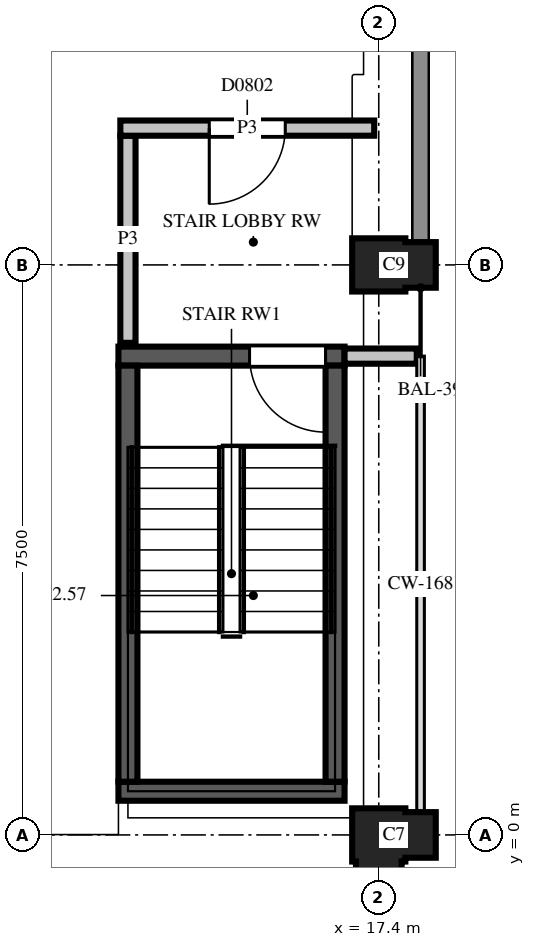
"""IFC4 building model, lengths in metres.
Left out: names, types, materials, properties, quantities, classifications, styles, units other than length and angle.
Written with IfcOpenShell. Run it as: python <this file> out.ifc"""

import sys

from ifc_helpers import new_model, si_unit, direction, frame, frame_2d, origin, place, context, subcontext, project, spatial, polyline, rectangle, outline, extrude, element, fill, save


model = new_model("IFC4")
c1 = context("Model", 3, precision=1e-05, world=origin(), true_north=direction((0.0, 1.0)))
c2 = subcontext(c1, "Body", "Model", "MODEL_VIEW")
j1 = project(units=[si_unit("LENGTHUNIT", "METRE"), si_unit("PLANEANGLEUNIT", "RADIAN")], contexts=[c1])
p1 = place(None, origin())
s1 = spatial("IfcSite", under=j1, at=p1, CompositionType="ELEMENT")
p2 = place(p1, origin())
s2 = spatial("IfcBuilding", under=s1, at=p2, CompositionType="ELEMENT")
p3 = place(p2, frame((0.0, 0.0, 30.4)))
s3 = spatial("IfcBuildingStorey", under=s2, at=p3, CompositionType="ELEMENT", Elevation=30.4)
p4 = place(p3, frame((17.4, 0.0, 0.0), z_axis=(0.0, 0.0, 1.0), x_axis=(0.0, -1.0, 0.0)))
e1 = element("IfcColumn", 1, at=p4, inside=s3, PredefinedType="COLUMN", context=c2, shape_type="SweptSolid", body=[
    extrude(outline(polyline([(-0.35, -0.35), (0.35, -0.35), (0.35, -0.3), (0.75, -0.3), (0.75, 0.3), (0.35, 0.3), (0.35, 0.35), (0.3, 0.35), (0.3, 0.75), (-0.3, 0.75), (-0.3, 0.35), (-0.35, 0.35), (-0.35, -0.35)])), origin(), (0.0, 0.0, 1.0), 3.7),
])
p5 = place(p3, frame((17.4, 7.5, 0.0), z_axis=(0.0, 0.0, 1.0), x_axis=(1.0, 0.0, 0.0)))
e2 = element("IfcColumn", 2, at=p5, inside=s3, PredefinedType="COLUMN", context=c2, shape_type="SweptSolid", body=[
    extrude(outline(polyline([(-0.35, -0.35), (0.35, -0.35), (0.35, -0.3), (0.75, -0.3), (0.75, 0.3), (0.35, 0.3), (0.35, 0.35), (-0.35, 0.35), (-0.35, -0.35)])), origin(), (0.0, 0.0, 1.0), 3.7),
])
p6 = place(p3, frame((13.975, 0.575, 0.0), z_axis=(0.0, 0.0, 1.0), x_axis=(1.0, 0.0, 0.0)))
e3 = element("IfcWall", 3, at=p6, inside=s3, PredefinedType="SHEAR", context=c2, shape_type="SweptSolid", body=[
    extrude(rectangle(XDim=2.975, YDim=0.25, at=frame_2d((1.487, 0.0))), origin(), (0.0, 0.0, 1.0), 3.7),
])
p7 = place(p3, frame((13.975, 6.3, 0.0), z_axis=(0.0, 0.0, 1.0), x_axis=(1.0, 0.0, 0.0)))
e4 = element("IfcWall", 4, at=p7, inside=s3, PredefinedType="SHEAR", context=c2, shape_type="SweptSolid", body=[
    extrude(rectangle(XDim=2.975, YDim=0.25, at=frame_2d((1.487, 0.0))), origin(), (0.0, 0.0, 1.0), 3.7),
])
p8 = place(p7, frame((1.725, 0.0, 0.0)))
e5 = element("IfcOpeningElement", 5, at=p8, cuts=e4, PredefinedType="OPENING", context=c2, shape_type="SweptSolid", body=[
    extrude(rectangle(XDim=1.0, YDim=2.1, at=frame_2d((0.5, 1.05))), frame((0.0, 0.135, 0.0), z_axis=(0.0, -1.0, 0.0), x_axis=(1.0, 0.0, 0.0)), (0.0, 0.0, 1.0), 0.27),
])
for number, where, z_axis, x_axis in (
    (6, (14.1, 0.7, 0.0), (0.0, 0.0, 1.0), (0.0, 1.0, 0.0)),
    (7, (16.825, 0.7, 0.0), (0.0, 0.0, 1.0), (0.0, 1.0, 0.0)),
):
    element("IfcWall", number, at=place(p3, frame(where, z_axis=z_axis, x_axis=x_axis)), inside=s3, PredefinedType="SHEAR", context=c2, shape_type="SweptSolid", body=[
        extrude(rectangle(XDim=5.475, YDim=0.25, at=frame_2d((2.738, 0.0))), origin(), (0.0, 0.0, 1.0), 3.7),
    ])
p9 = place(p3, frame((16.95, 6.3, 0.0), z_axis=(0.0, 0.0, 1.0), x_axis=(1.0, 0.0, 0.0)))
e8 = element("IfcWall", 8, at=p9, inside=s3, PredefinedType="PARTITIONING", context=c2, shape_type="SweptSolid", body=[
    extrude(rectangle(XDim=0.95, YDim=0.2, at=frame_2d((0.475, 0.0))), origin(), (0.0, 0.0, 1.0), 2.88),
])
p10 = place(p3, frame((14.1, 9.2, 0.0), z_axis=(0.0, 0.0, 1.0), x_axis=(0.0, -1.0, 0.0)))
e9 = element("IfcWall", 9, at=p10, inside=s3, PredefinedType="PARTITIONING", context=c2, shape_type="SweptSolid", body=[
    extrude(rectangle(XDim=2.725, YDim=0.2, at=frame_2d((1.362, 0.0))), origin(), (0.0, 0.0, 1.0), 2.88),
])
p11 = place(p3, frame((17.34, 9.3, 0.0), z_axis=(0.0, 0.0, 1.0), x_axis=(-1.0, 0.0, 0.0)))
e10 = element("IfcWall", 10, at=p11, inside=s3, PredefinedType="PARTITIONING", context=c2, shape_type="SweptSolid", body=[
    extrude(rectangle(XDim=3.34, YDim=0.2, at=frame_2d((1.67, 0.0))), origin(), (0.0, 0.0, 1.0), 2.88),
])
p12 = place(p11, frame((1.17, 0.0, 0.0)))
e11 = element("IfcOpeningElement", 11, at=p12, cuts=e10, PredefinedType="OPENING", context=c2, shape_type="SweptSolid", body=[
    extrude(rectangle(XDim=1.0, YDim=2.1, at=frame_2d((0.5, 1.05))), frame((0.0, 0.11, 0.0), z_axis=(0.0, -1.0, 0.0), x_axis=(1.0, 0.0, 0.0)), (0.0, 0.0, 1.0), 0.22),
])
p13 = place(p12, origin())
e12 = element("IfcDoor", 12, at=p13, inside=s3, OperationType="SINGLE_SWING_LEFT", PredefinedType="DOOR", context=c2, shape_type="SweptSolid", body=[
    extrude(rectangle(XDim=1.0, YDim=2.1, at=frame_2d((0.5, 1.05))), frame((0.0, 0.025, 0.0), z_axis=(0.0, -1.0, 0.0), x_axis=(1.0, 0.0, 0.0)), (0.0, 0.0, 1.0), 0.05),
])
fill(e11, e12)
p14 = place(p8, origin())
e13 = element("IfcDoor", 13, at=p14, inside=s3, OperationType="SINGLE_SWING_RIGHT", PredefinedType="DOOR", context=c2, shape_type="SweptSolid", body=[
    extrude(rectangle(XDim=1.0, YDim=2.1, at=frame_2d((0.5, 1.05))), frame((0.0, 0.025, 0.0), z_axis=(0.0, -1.0, 0.0), x_axis=(1.0, 0.0, 0.0)), (0.0, 0.0, 1.0), 0.05),
])
fill(e5, e13)
save(model, sys.argv[1])
